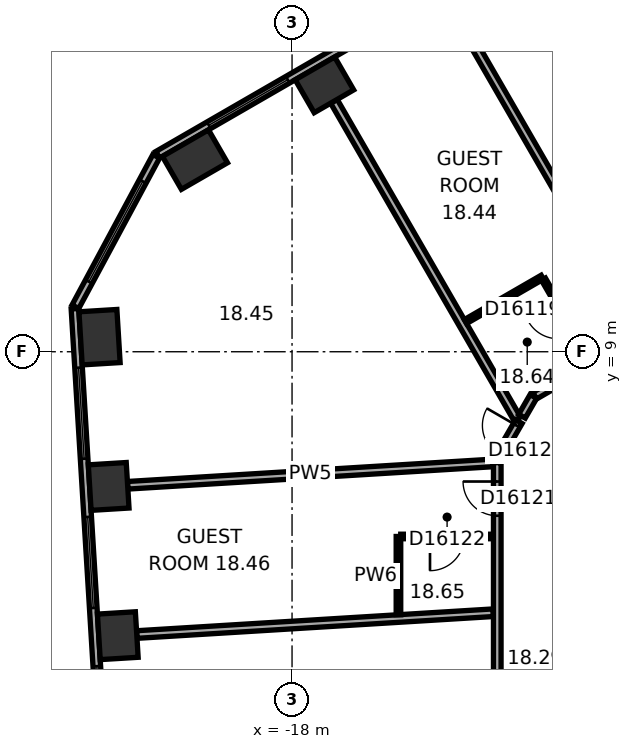
"""IFC4 building model, lengths in metres.
Left out: names, types, materials, properties, quantities, classifications, styles, units other than length and angle.
Written with IfcOpenShell. Run it as: python <this file> out.ifc"""

import sys

from ifc_helpers import new_model, si_unit, direction, frame, frame_2d, origin, origin_2d, place, context, subcontext, project, spatial, rectangle, extrude, element, fill, save


model = new_model("IFC4")
c1 = context("Model", 3, precision=1e-05, world=origin(), true_north=direction((0.0, 1.0)))
c2 = subcontext(c1, "Body", "Model", "MODEL_VIEW")
j1 = project(units=[si_unit("LENGTHUNIT", "METRE"), si_unit("PLANEANGLEUNIT", "RADIAN")], contexts=[c1])
p1 = place(None, origin())
s1 = spatial("IfcSite", under=j1, at=p1, CompositionType="ELEMENT")
p2 = place(p1, origin())
s2 = spatial("IfcBuilding", under=s1, at=p2, CompositionType="ELEMENT")
p3 = place(p2, frame((0.0, 0.0, 83.6)))
s3 = spatial("IfcBuildingStorey", under=s2, at=p3, CompositionType="ELEMENT", Elevation=83.6)
p4 = place(p3, frame((-17.148, 16.023, 0.0), z_axis=(0.0, 0.0, 1.0), x_axis=(-0.866025403784, -0.5, 0.0)))
e1 = element("IfcColumn", 1, at=p4, inside=s3, PredefinedType="COLUMN", context=c2, shape_type="SweptSolid", body=[
    extrude(rectangle(XDim=1.2, YDim=1.0, at=origin_2d()), origin(), (0.0, 0.0, 1.0), 3.3),
])
for number, where, z_axis, x_axis in (
    (2, (-20.555, 14.055, 0.0), (0.0, 0.0, 1.0), (-0.866, -0.5, 0.0)),
    (3, (-23.066, 9.383, 0.0), (0.0, 0.0, 1.0), (0.061, -0.998, 0.0)),
):
    element("IfcColumn", number, at=place(p3, frame(where, z_axis=z_axis, x_axis=x_axis)), inside=s3, PredefinedType="COLUMN", context=c2, shape_type="SweptSolid", body=[
        extrude(rectangle(XDim=1.4, YDim=1.0, at=origin_2d()), origin(), (0.0, 0.0, 1.0), 3.3),
    ])
for number, where, z_axis, x_axis in (
    (4, (-22.826, 5.456, 0.0), (0.0, 0.0, 1.0), (0.061, -0.998, 0.0)),
    (5, (-22.585, 1.529, 0.0), (0.0, 0.0, 1.0), (0.061, -0.998, 0.0)),
):
    element("IfcColumn", number, at=place(p3, frame(where, z_axis=z_axis, x_axis=x_axis)), inside=s3, PredefinedType="COLUMN", context=c2, shape_type="SweptSolid", body=[
        extrude(rectangle(XDim=1.2, YDim=1.0, at=origin_2d()), origin(), (0.0, 0.0, 1.0), 3.3),
    ])
p5 = place(p3, frame((-3.136, 24.805, 0.0), z_axis=(0.0, 0.0, 1.0), x_axis=(-0.866028291626, -0.499994998079, 0.0)))
e6 = element("IfcWall", 6, at=p5, inside=s3, PredefinedType="STANDARD", context=c2, shape_type="SweptSolid", body=[
    extrude(rectangle(XDim=21.246, YDim=0.2, at=frame_2d((10.623, 0.0))), origin(), (0.0, 0.0, 1.0), 3.3),
])
p6 = place(p5, frame((1.555, 0.0, 0.8)))
e7 = element("IfcOpeningElement", 7, at=p6, cuts=e6, PredefinedType="OPENING", context=c2, shape_type="SweptSolid", body=[
    extrude(rectangle(XDim=2.4, YDim=1.7, at=frame_2d((1.2, 0.85))), frame((0.0, 0.11, 0.0), z_axis=(0.0, -1.0, 0.0), x_axis=(1.0, 0.0, 0.0)), (0.0, 0.0, 1.0), 0.22),
])
p7 = place(p5, frame((5.489, 0.0, 0.8)))
e8 = element("IfcOpeningElement", 8, at=p7, cuts=e6, PredefinedType="OPENING", context=c2, shape_type="SweptSolid", body=[
    extrude(rectangle(XDim=2.4, YDim=1.7, at=frame_2d((1.2, 0.85))), frame((0.0, 0.11, 0.0), z_axis=(0.0, -1.0, 0.0), x_axis=(1.0, 0.0, 0.0)), (0.0, 0.0, 1.0), 0.22),
])
p8 = place(p5, frame((9.424, 0.0, 0.8)))
e9 = element("IfcOpeningElement", 9, at=p8, cuts=e6, PredefinedType="OPENING", context=c2, shape_type="SweptSolid", body=[
    extrude(rectangle(XDim=2.4, YDim=1.7, at=frame_2d((1.2, 0.85))), frame((0.0, 0.11, 0.0), z_axis=(0.0, -1.0, 0.0), x_axis=(1.0, 0.0, 0.0)), (0.0, 0.0, 1.0), 0.22),
])
p9 = place(p5, frame((13.358, 0.0, 0.8)))
e10 = element("IfcOpeningElement", 10, at=p9, cuts=e6, PredefinedType="OPENING", context=c2, shape_type="SweptSolid", body=[
    extrude(rectangle(XDim=2.4, YDim=1.7, at=frame_2d((1.2, 0.85))), frame((0.0, 0.11, 0.0), z_axis=(0.0, -1.0, 0.0), x_axis=(1.0, 0.0, 0.0)), (0.0, 0.0, 1.0), 0.22),
])
p10 = place(p5, frame((17.293, 0.0, 0.8)))
e11 = element("IfcOpeningElement", 11, at=p10, cuts=e6, PredefinedType="OPENING", context=c2, shape_type="SweptSolid", body=[
    extrude(rectangle(XDim=2.4, YDim=1.7, at=frame_2d((1.2, 0.85))), frame((0.0, 0.11, 0.0), z_axis=(0.0, -1.0, 0.0), x_axis=(1.0, 0.0, 0.0)), (0.0, 0.0, 1.0), 0.22),
])
p11 = place(p3, frame((-21.574, 14.143, 0.0), z_axis=(0.0, 0.0, 1.0), x_axis=(-0.473292949472, -0.880905093628, 0.0)))
e12 = element("IfcWall", 12, at=p11, inside=s3, PredefinedType="STANDARD", context=c2, shape_type="SweptSolid", body=[
    extrude(rectangle(XDim=4.494, YDim=0.2, at=frame_2d((2.247, 0.0))), origin(), (0.0, 0.0, 1.0), 3.3),
])
p12 = place(p11, frame((0.747, 0.0, 0.8)))
e13 = element("IfcOpeningElement", 13, at=p12, cuts=e12, PredefinedType="OPENING", context=c2, shape_type="SweptSolid", body=[
    extrude(rectangle(XDim=3.0, YDim=1.7, at=frame_2d((1.5, 0.85))), frame((0.0, 0.11, 0.0), z_axis=(0.0, -1.0, 0.0), x_axis=(1.0, 0.0, 0.0)), (0.0, 0.0, 1.0), 0.22),
])
p13 = place(p3, frame((-23.713, 10.131, 0.0), z_axis=(0.0, 0.0, 1.0), x_axis=(0.061040439785, -0.998135293791, 0.0)))
e14 = element("IfcWall", 14, at=p13, inside=s3, PredefinedType="STANDARD", context=c2, shape_type="SweptSolid", body=[
    extrude(rectangle(XDim=21.246, YDim=0.2, at=frame_2d((10.623, 0.0))), origin(), (0.0, 0.0, 1.0), 3.3),
])
p14 = place(p13, frame((1.553, 0.0, 0.8)))
e15 = element("IfcOpeningElement", 15, at=p14, cuts=e14, PredefinedType="OPENING", context=c2, shape_type="SweptSolid", body=[
    extrude(rectangle(XDim=2.4, YDim=1.7, at=frame_2d((1.2, 0.85))), frame((0.0, 0.11, 0.0), z_axis=(0.0, -1.0, 0.0), x_axis=(1.0, 0.0, 0.0)), (0.0, 0.0, 1.0), 0.22),
])
p15 = place(p13, frame((5.488, 0.0, 0.8)))
e16 = element("IfcOpeningElement", 16, at=p15, cuts=e14, PredefinedType="OPENING", context=c2, shape_type="SweptSolid", body=[
    extrude(rectangle(XDim=2.4, YDim=1.7, at=frame_2d((1.2, 0.85))), frame((0.0, 0.11, 0.0), z_axis=(0.0, -1.0, 0.0), x_axis=(1.0, 0.0, 0.0)), (0.0, 0.0, 1.0), 0.22),
])
p16 = place(p13, frame((9.422, 0.0, 0.8)))
e17 = element("IfcOpeningElement", 17, at=p16, cuts=e14, PredefinedType="OPENING", context=c2, shape_type="SweptSolid", body=[
    extrude(rectangle(XDim=2.4, YDim=1.7, at=frame_2d((1.2, 0.85))), frame((0.0, 0.11, 0.0), z_axis=(0.0, -1.0, 0.0), x_axis=(1.0, 0.0, 0.0)), (0.0, 0.0, 1.0), 0.22),
])
p17 = place(p13, frame((13.357, 0.0, 0.8)))
e18 = element("IfcOpeningElement", 18, at=p17, cuts=e14, PredefinedType="OPENING", context=c2, shape_type="SweptSolid", body=[
    extrude(rectangle(XDim=2.4, YDim=1.7, at=frame_2d((1.2, 0.85))), frame((0.0, 0.11, 0.0), z_axis=(0.0, -1.0, 0.0), x_axis=(1.0, 0.0, 0.0)), (0.0, 0.0, 1.0), 0.22),
])
p18 = place(p13, frame((17.292, 0.0, 0.8)))
e19 = element("IfcOpeningElement", 19, at=p18, cuts=e14, PredefinedType="OPENING", context=c2, shape_type="SweptSolid", body=[
    extrude(rectangle(XDim=2.4, YDim=1.7, at=frame_2d((1.2, 0.85))), frame((0.0, 0.11, 0.0), z_axis=(0.0, -1.0, 0.0), x_axis=(1.0, 0.0, 0.0)), (0.0, 0.0, 1.0), 0.22),
])
p19 = place(p3, frame((-22.327, 5.486, 0.0), z_axis=(0.0, 0.0, 1.0), x_axis=(0.998135194863, 0.061042057435, 0.0)))
e20 = element("IfcWall", 20, at=p19, inside=s3, PredefinedType="PARTITIONING", context=c2, shape_type="SweptSolid", body=[
    extrude(rectangle(XDim=9.635, YDim=0.2, at=frame_2d((4.817, 0.0))), origin(), (0.0, 0.0, 1.0), 3.05),
])
p20 = place(p3, frame((-22.086, 1.559, 0.0), z_axis=(0.0, 0.0, 1.0), x_axis=(0.99813491363, 0.061046655873, 0.0)))
e21 = element("IfcWall", 21, at=p20, inside=s3, PredefinedType="PARTITIONING", context=c2, shape_type="SweptSolid", body=[
    extrude(rectangle(XDim=9.394, YDim=0.2, at=frame_2d((4.697, 0.0))), origin(), (0.0, 0.0, 1.0), 2.6),
])
p21 = place(p3, frame((-16.898, 15.59, 0.0), z_axis=(0.0, 0.0, 1.0), x_axis=(0.499994742786, -0.866028439017, 0.0)))
e22 = element("IfcWall", 22, at=p21, inside=s3, PredefinedType="PARTITIONING", context=c2, shape_type="SweptSolid", body=[
    extrude(rectangle(XDim=9.65, YDim=0.2, at=frame_2d((4.825, 0.0))), origin(), (0.0, 0.0, 1.0), 3.05),
])
p22 = place(p3, frame((-15.2, 2.08, 0.0), z_axis=(0.0, 0.0, 1.0), x_axis=(0.0, 1.0, 0.0)))
e23 = element("IfcWall", 23, at=p22, inside=s3, PredefinedType="PARTITIONING", context=c2, shape_type="SweptSolid", body=[
    extrude(rectangle(XDim=2.059, YDim=0.12, at=frame_2d((1.03, 0.0))), origin(), (0.0, 0.0, 1.0), 3.05),
])
p23 = place(p3, frame((-15.14, 4.139, 0.0), z_axis=(0.0, 0.0, 1.0), x_axis=(1.0, 0.0, 0.0)))
e24 = element("IfcWall", 24, at=p23, inside=s3, PredefinedType="PARTITIONING", context=c2, shape_type="SweptSolid", body=[
    extrude(rectangle(XDim=2.44, YDim=0.12, at=frame_2d((1.22, 0.0))), origin(), (0.0, 0.0, 1.0), 3.05),
])
p24 = place(p23, frame((0.77, 0.0, 0.0)))
e25 = element("IfcOpeningElement", 25, at=p24, cuts=e24, PredefinedType="OPENING", context=c2, shape_type="SweptSolid", body=[
    extrude(rectangle(XDim=0.9, YDim=2.1, at=frame_2d((0.45, 1.05))), frame((0.0, 0.07, 0.0), z_axis=(0.0, -1.0, 0.0), x_axis=(1.0, 0.0, 0.0)), (0.0, 0.0, 1.0), 0.14),
])
p25 = place(p3, frame((-13.436, 9.794, 0.0), z_axis=(0.0, 0.0, 1.0), x_axis=(0.866053246676, 0.499951771596, 0.0)))
e26 = element("IfcWall", 26, at=p25, inside=s3, PredefinedType="PARTITIONING", context=c2, shape_type="SweptSolid", body=[
    extrude(rectangle(XDim=2.335, YDim=0.12, at=frame_2d((1.167, 0.0))), origin(), (0.0, 0.0, 1.0), 3.05),
])
p26 = place(p3, frame((-12.6, 6.081, 0.0), z_axis=(0.0, 0.0, 1.0), x_axis=(0.0, -1.0, 0.0)))
e27 = element("IfcWall", 27, at=p26, inside=s3, PredefinedType="PARTITIONING", context=c2, shape_type="SweptSolid", body=[
    extrude(rectangle(XDim=12.219, YDim=0.2, at=frame_2d((6.109, 0.0))), origin(), (0.0, 0.0, 1.0), 3.05),
])
p27 = place(p26, frame((0.496, 0.0, 0.0)))
e28 = element("IfcOpeningElement", 28, at=p27, cuts=e27, PredefinedType="OPENING", context=c2, shape_type="SweptSolid", body=[
    extrude(rectangle(XDim=0.9, YDim=2.1, at=frame_2d((0.45, 1.05))), frame((0.0, 0.11, 0.0), z_axis=(0.0, -1.0, 0.0), x_axis=(1.0, 0.0, 0.0)), (0.0, 0.0, 1.0), 0.22),
])
p28 = place(p26, frame((7.384, 0.0, 0.0)))
e29 = element("IfcOpeningElement", 29, at=p28, cuts=e27, PredefinedType="OPENING", context=c2, shape_type="SweptSolid", body=[
    extrude(rectangle(XDim=1.0, YDim=2.1, at=frame_2d((0.5, 1.05))), frame((0.0, 0.11, 0.0), z_axis=(0.0, -1.0, 0.0), x_axis=(1.0, 0.0, 0.0)), (0.0, 0.0, 1.0), 0.22),
])
p29 = place(p3, frame((-12.032, 7.162, 0.0), z_axis=(0.0, 0.0, 1.0), x_axis=(-0.499951829968, -0.866053212979, 0.0)))
e30 = element("IfcWall", 30, at=p29, inside=s3, PredefinedType="PARTITIONING", context=c2, shape_type="SweptSolid", body=[
    extrude(rectangle(XDim=1.136, YDim=0.2, at=frame_2d((0.568, 0.0))), origin(), (0.0, 0.0, 1.0), 3.05),
])
p30 = place(p29, frame((0.118, 0.0, 0.0)))
e31 = element("IfcOpeningElement", 31, at=p30, cuts=e30, PredefinedType="OPENING", context=c2, shape_type="SweptSolid", body=[
    extrude(rectangle(XDim=0.9, YDim=2.1, at=frame_2d((0.45, 1.05))), frame((0.0, 0.11, 0.0), z_axis=(0.0, -1.0, 0.0), x_axis=(1.0, 0.0, 0.0)), (0.0, 0.0, 1.0), 0.22),
])
p31 = place(p3, frame((-11.65, 7.823, 0.0), z_axis=(0.0, 0.0, 1.0), x_axis=(-0.50012165622, -0.865955154139, 0.0)))
e32 = element("IfcWall", 32, at=p31, inside=s3, PredefinedType="PARTITIONING", context=c2, shape_type="SweptSolid", body=[
    extrude(rectangle(XDim=0.6, YDim=0.2, at=frame_2d((0.3, 0.0))), origin(), (0.0, 0.0, 1.0), 3.05),
])
p32 = place(p3, frame((-11.385, 10.909, 0.0), z_axis=(0.0, 0.0, 1.0), x_axis=(0.500077547548, -0.865980627057, 0.0)))
e33 = element("IfcWall", 33, at=p32, inside=s3, PredefinedType="PARTITIONING", context=c2, shape_type="SweptSolid", body=[
    extrude(rectangle(XDim=2.44, YDim=0.12, at=frame_2d((1.22, 0.0))), origin(), (0.0, 0.0, 1.0), 3.05),
])
p33 = place(p32, frame((0.77, 0.0, 0.0)))
e34 = element("IfcOpeningElement", 34, at=p33, cuts=e33, PredefinedType="OPENING", context=c2, shape_type="SweptSolid", body=[
    extrude(rectangle(XDim=0.9, YDim=2.1, at=frame_2d((0.45, 1.05))), frame((0.0, 0.07, 0.0), z_axis=(0.0, -1.0, 0.0), x_axis=(1.0, 0.0, 0.0)), (0.0, 0.0, 1.0), 0.14),
])
p34 = place(p3, frame((-8.902, 9.41, 0.0), z_axis=(0.0, 0.0, 1.0), x_axis=(-0.866014299198, -0.500019233215, 0.0)))
e35 = element("IfcWall", 35, at=p34, inside=s3, PredefinedType="PARTITIONING", context=c2, shape_type="SweptSolid", body=[
    extrude(rectangle(XDim=3.133, YDim=0.2, at=frame_2d((1.567, 0.0))), origin(), (0.0, 0.0, 1.0), 3.05),
])
p35 = place(p34, frame((0.225, 0.0, 0.0)))
e36 = element("IfcOpeningElement", 36, at=p35, cuts=e35, PredefinedType="OPENING", context=c2, shape_type="SweptSolid", body=[
    extrude(rectangle(XDim=0.9, YDim=2.1, at=frame_2d((0.45, 1.05))), frame((0.0, 0.11, 0.0), z_axis=(0.0, -1.0, 0.0), x_axis=(1.0, 0.0, 0.0)), (0.0, 0.0, 1.0), 0.22),
])
p36 = place(p3, frame((-7.865, 7.814, 0.0), z_axis=(0.0, 0.0, 1.0), x_axis=(-0.500004234368, 0.866022959057, 0.0)))
e37 = element("IfcWall", 37, at=p36, inside=s3, PredefinedType="PARTITIONING", context=c2, shape_type="SweptSolid", body=[
    extrude(rectangle(XDim=11.25, YDim=0.2, at=frame_2d((5.625, 0.0))), origin(), (0.0, 0.0, 1.0), 3.05),
])
p37 = place(p36, frame((0.5, 0.0, 0.0)))
e38 = element("IfcOpeningElement", 38, at=p37, cuts=e37, PredefinedType="OPENING", context=c2, shape_type="SweptSolid", body=[
    extrude(rectangle(XDim=0.9, YDim=2.1, at=frame_2d((0.45, 1.05))), frame((0.0, 0.11, 0.0), z_axis=(0.0, -1.0, 0.0), x_axis=(1.0, 0.0, 0.0)), (0.0, 0.0, 1.0), 0.22),
])
p38 = place(p10, origin())
e39 = element("IfcWindow", 39, at=p38, inside=s3, PartitioningType="SINGLE_PANEL", PredefinedType="WINDOW", context=c2, shape_type="SweptSolid", body=[
    extrude(rectangle(XDim=2.4, YDim=1.7, at=frame_2d((1.2, 0.85))), frame((0.0, 0.03, 0.0), z_axis=(0.0, -1.0, 0.0), x_axis=(1.0, 0.0, 0.0)), (0.0, 0.0, 1.0), 0.06),
])
fill(e11, e39)
p39 = place(p12, origin())
e40 = element("IfcWindow", 40, at=p39, inside=s3, PartitioningType="SINGLE_PANEL", PredefinedType="WINDOW", context=c2, shape_type="SweptSolid", body=[
    extrude(rectangle(XDim=3.0, YDim=1.7, at=frame_2d((1.5, 0.85))), frame((0.0, 0.03, 0.0), z_axis=(0.0, -1.0, 0.0), x_axis=(1.0, 0.0, 0.0)), (0.0, 0.0, 1.0), 0.06),
])
fill(e13, e40)
p40 = place(p14, origin())
e41 = element("IfcWindow", 41, at=p40, inside=s3, PartitioningType="SINGLE_PANEL", PredefinedType="WINDOW", context=c2, shape_type="SweptSolid", body=[
    extrude(rectangle(XDim=2.4, YDim=1.7, at=frame_2d((1.2, 0.85))), frame((0.0, 0.03, 0.0), z_axis=(0.0, -1.0, 0.0), x_axis=(1.0, 0.0, 0.0)), (0.0, 0.0, 1.0), 0.06),
])
fill(e15, e41)
p41 = place(p15, origin())
e42 = element("IfcWindow", 42, at=p41, inside=s3, PartitioningType="SINGLE_PANEL", PredefinedType="WINDOW", context=c2, shape_type="SweptSolid", body=[
    extrude(rectangle(XDim=2.4, YDim=1.7, at=frame_2d((1.2, 0.85))), frame((0.0, 0.03, 0.0), z_axis=(0.0, -1.0, 0.0), x_axis=(1.0, 0.0, 0.0)), (0.0, 0.0, 1.0), 0.06),
])
fill(e16, e42)
p42 = place(p16, origin())
e43 = element("IfcWindow", 43, at=p42, inside=s3, PartitioningType="SINGLE_PANEL", PredefinedType="WINDOW", context=c2, shape_type="SweptSolid", body=[
    extrude(rectangle(XDim=2.4, YDim=1.7, at=frame_2d((1.2, 0.85))), frame((0.0, 0.03, 0.0), z_axis=(0.0, -1.0, 0.0), x_axis=(1.0, 0.0, 0.0)), (0.0, 0.0, 1.0), 0.06),
])
fill(e17, e43)
p43 = place(p30, origin())
e44 = element("IfcDoor", 44, at=p43, inside=s3, OperationType="SINGLE_SWING_LEFT", PredefinedType="DOOR", context=c2, shape_type="SweptSolid", body=[
    extrude(rectangle(XDim=0.9, YDim=2.1, at=frame_2d((0.45, 1.05))), frame((0.0, 0.025, 0.0), z_axis=(0.0, -1.0, 0.0), x_axis=(1.0, 0.0, 0.0)), (0.0, 0.0, 1.0), 0.05),
])
fill(e31, e44)
p44 = place(p27, origin())
e45 = element("IfcDoor", 45, at=p44, inside=s3, OperationType="SINGLE_SWING_LEFT", PredefinedType="DOOR", context=c2, shape_type="SweptSolid", body=[
    extrude(rectangle(XDim=0.9, YDim=2.1, at=frame_2d((0.45, 1.05))), frame((0.0, 0.025, 0.0), z_axis=(0.0, -1.0, 0.0), x_axis=(1.0, 0.0, 0.0)), (0.0, 0.0, 1.0), 0.05),
])
fill(e28, e45)
p45 = place(p24, origin())
e46 = element("IfcDoor", 46, at=p45, inside=s3, OperationType="SINGLE_SWING_LEFT", PredefinedType="DOOR", context=c2, shape_type="SweptSolid", body=[
    extrude(rectangle(XDim=0.9, YDim=2.1, at=frame_2d((0.45, 1.05))), frame((0.0, 0.025, 0.0), z_axis=(0.0, -1.0, 0.0), x_axis=(1.0, 0.0, 0.0)), (0.0, 0.0, 1.0), 0.05),
])
fill(e25, e46)
save(model, sys.argv[1])
